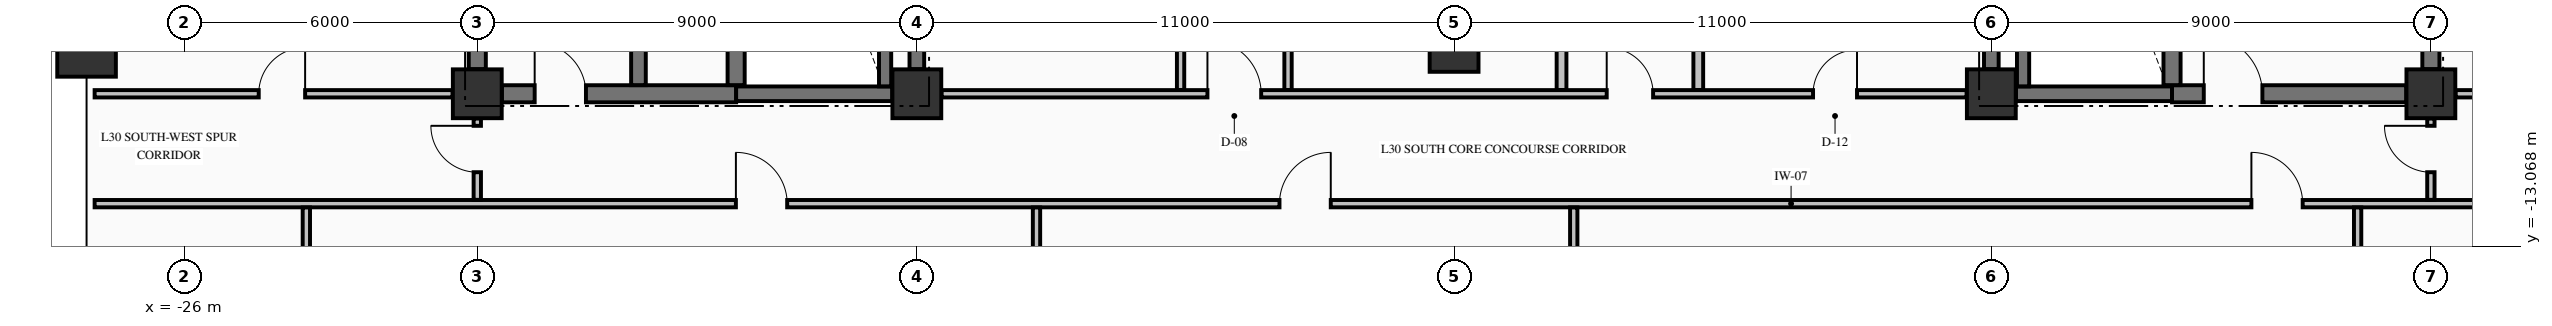
"""IFC4 building model, lengths in metres.
Left out: names, types, materials, properties, quantities, classifications, styles, units other than length and angle.
Written with IfcOpenShell. Run it as: python <this file> out.ifc"""

import sys

from ifc_helpers import new_model, si_unit, direction, frame, frame_2d, origin, origin_2d, place, context, subcontext, project, spatial, rectangle, extrude, element, fill, save


model = new_model("IFC4")
c1 = context("Model", 3, precision=1e-05, world=origin(), true_north=direction((0.0, 1.0)))
c2 = subcontext(c1, "Body", "Model", "MODEL_VIEW")
j1 = project(units=[si_unit("LENGTHUNIT", "METRE"), si_unit("PLANEANGLEUNIT", "RADIAN")], contexts=[c1])
p1 = place(None, origin())
s1 = spatial("IfcSite", under=j1, at=p1, CompositionType="ELEMENT")
p2 = place(p1, origin())
s2 = spatial("IfcBuilding", under=s1, at=p2, CompositionType="ELEMENT")
p3 = place(p2, frame((0.0, 0.0, 121.35)))
s3 = spatial("IfcBuildingStorey", under=s2, at=p3, CompositionType="ELEMENT", Elevation=121.35)
p4 = place(p3, frame((-28.0, -9.0, -0.425), z_axis=(0.0, 0.0, 1.0), x_axis=(1.0, 0.0, 0.0)))
e1 = element("IfcColumn", 1, at=p4, inside=s3, PredefinedType="COLUMN", context=c2, shape_type="SweptSolid", body=[
    extrude(rectangle(XDim=1.2, YDim=1.2, at=origin_2d()), origin(), (0.0, 0.0, 1.0), 3.745),
])
for number, where, z_axis, x_axis in (
    (2, (-20.0, -9.95, -0.425), (0.0, 0.0, 1.0), (1.0, 0.0, 0.0)),
    (3, (-11.0, -9.95, -0.425), (0.0, 0.0, 1.0), (1.0, 0.0, 0.0)),
    (4, (11.0, -9.95, -0.425), (0.0, 0.0, 1.0), (1.0, 0.0, 0.0)),
    (5, (20.0, -9.95, -0.425), (0.0, 0.0, 1.0), (1.0, 0.0, 0.0)),
    (6, (0.0, -9.0, -0.425), (0.0, 0.0, 1.0), (1.0, 0.0, 0.0)),
):
    element("IfcColumn", number, at=place(p3, frame(where, z_axis=z_axis, x_axis=x_axis)), inside=s3, PredefinedType="COLUMN", context=c2, shape_type="SweptSolid", body=[
        extrude(rectangle(XDim=1.0, YDim=1.0, at=origin_2d()), origin(), (0.0, 0.0, 1.0), 3.745),
    ])
p5 = place(p3, frame((-19.496, -9.95, 0.0), z_axis=(0.0, 0.0, 1.0), x_axis=(1.0, 0.0, 0.0)))
e7 = element("IfcWall", 7, at=p5, inside=s3, PredefinedType="SHEAR", context=c2, shape_type="SweptSolid", body=[
    extrude(rectangle(XDim=4.796, YDim=0.35, at=frame_2d((2.398, 0.0))), origin(), (0.0, 0.0, 1.0), 3.32),
])
p6 = place(p5, frame((0.671, 0.0, 0.0)))
e8 = element("IfcOpeningElement", 8, at=p6, cuts=e7, PredefinedType="OPENING", context=c2, shape_type="SweptSolid", body=[
    extrude(rectangle(XDim=1.05, YDim=2.15, at=frame_2d((0.525, 1.075))), frame((0.0, 0.185, 0.0), z_axis=(0.0, -1.0, 0.0), x_axis=(1.0, 0.0, 0.0)), (0.0, 0.0, 1.0), 0.37),
])
for number, where, z_axis, x_axis in (
    (9, (-14.7, -9.95, 0.0), (0.0, 0.0, 1.0), (1.0, 0.0, 0.0)),
    (10, (11.504, -9.95, 0.0), (0.0, 0.0, 1.0), (1.0, 0.0, 0.0)),
):
    element("IfcWall", number, at=place(p3, frame(where, z_axis=z_axis, x_axis=x_axis)), inside=s3, PredefinedType="SHEAR", context=c2, shape_type="SweptSolid", body=[
        extrude(rectangle(XDim=3.196, YDim=0.3, at=frame_2d((1.598, 0.0))), origin(), (0.0, 0.0, 1.0), 3.32),
    ])
p7 = place(p3, frame((14.7, -9.95, 0.0), z_axis=(0.0, 0.0, 1.0), x_axis=(1.0, 0.0, 0.0)))
e11 = element("IfcWall", 11, at=p7, inside=s3, PredefinedType="SHEAR", context=c2, shape_type="SweptSolid", body=[
    extrude(rectangle(XDim=4.796, YDim=0.35, at=frame_2d((2.398, 0.0))), origin(), (0.0, 0.0, 1.0), 3.32),
])
p8 = place(p7, frame((0.65, 0.0, 0.0)))
e12 = element("IfcOpeningElement", 12, at=p8, cuts=e11, PredefinedType="OPENING", context=c2, shape_type="SweptSolid", body=[
    extrude(rectangle(XDim=1.2, YDim=2.15, at=frame_2d((0.6, 1.075))), frame((0.0, 0.185, 0.0), z_axis=(0.0, -1.0, 0.0), x_axis=(1.0, 0.0, 0.0)), (0.0, 0.0, 1.0), 0.37),
])
p9 = place(p3, frame((-27.835, -12.2, 0.0), z_axis=(0.0, 0.0, 1.0), x_axis=(1.0, 0.0, 0.0)))
e13 = element("IfcWall", 13, at=p9, inside=s3, PredefinedType="PARTITIONING", context=c2, shape_type="SweptSolid", body=[
    extrude(rectangle(XDim=50.67, YDim=0.15, at=frame_2d((25.335, 0.0))), origin(), (0.0, 0.0, 1.0), 3.32),
])
p10 = place(p9, frame((13.13, 0.0, 0.0)))
e14 = element("IfcOpeningElement", 14, at=p10, cuts=e13, PredefinedType="OPENING", context=c2, shape_type="SweptSolid", body=[
    extrude(rectangle(XDim=1.05, YDim=2.15, at=frame_2d((0.525, 1.075))), frame((0.0, 0.085, 0.0), z_axis=(0.0, -1.0, 0.0), x_axis=(1.0, 0.0, 0.0)), (0.0, 0.0, 1.0), 0.17),
])
p11 = place(p9, frame((24.26, 0.0, 0.0)))
e15 = element("IfcOpeningElement", 15, at=p11, cuts=e13, PredefinedType="OPENING", context=c2, shape_type="SweptSolid", body=[
    extrude(rectangle(XDim=1.05, YDim=2.15, at=frame_2d((0.525, 1.075))), frame((0.0, 0.085, 0.0), z_axis=(0.0, -1.0, 0.0), x_axis=(1.0, 0.0, 0.0)), (0.0, 0.0, 1.0), 0.17),
])
p12 = place(p9, frame((44.16, 0.0, 0.0)))
e16 = element("IfcOpeningElement", 16, at=p12, cuts=e13, PredefinedType="OPENING", context=c2, shape_type="SweptSolid", body=[
    extrude(rectangle(XDim=1.05, YDim=2.15, at=frame_2d((0.525, 1.075))), frame((0.0, 0.085, 0.0), z_axis=(0.0, -1.0, 0.0), x_axis=(1.0, 0.0, 0.0)), (0.0, 0.0, 1.0), 0.17),
])
p13 = place(p3, frame((-27.835, -9.95, 0.0), z_axis=(0.0, 0.0, 1.0), x_axis=(1.0, 0.0, 0.0)))
e17 = element("IfcWall", 17, at=p13, inside=s3, PredefinedType="PARTITIONING", context=c2, shape_type="SweptSolid", body=[
    extrude(rectangle(XDim=7.329, YDim=0.15, at=frame_2d((3.665, 0.0))), origin(), (0.0, 0.0, 1.0), 3.32),
])
p14 = place(p13, frame((3.36, 0.0, 0.0)))
e18 = element("IfcOpeningElement", 18, at=p14, cuts=e17, PredefinedType="OPENING", context=c2, shape_type="SweptSolid", body=[
    extrude(rectangle(XDim=0.95, YDim=2.15, at=frame_2d((0.475, 1.075))), frame((0.0, 0.085, 0.0), z_axis=(0.0, -1.0, 0.0), x_axis=(1.0, 0.0, 0.0)), (0.0, 0.0, 1.0), 0.17),
])
p15 = place(p3, frame((-10.494, -9.95, 0.0), z_axis=(0.0, 0.0, 1.0), x_axis=(1.0, 0.0, 0.0)))
e19 = element("IfcWall", 19, at=p15, inside=s3, PredefinedType="PARTITIONING", context=c2, shape_type="SweptSolid", body=[
    extrude(rectangle(XDim=20.988, YDim=0.15, at=frame_2d((10.494, 0.0))), origin(), (0.0, 0.0, 1.0), 3.32),
])
p16 = place(p15, frame((5.444, 0.0, 0.0)))
e20 = element("IfcOpeningElement", 20, at=p16, cuts=e19, PredefinedType="OPENING", context=c2, shape_type="SweptSolid", body=[
    extrude(rectangle(XDim=1.1, YDim=2.15, at=frame_2d((0.55, 1.075))), frame((0.0, 0.085, 0.0), z_axis=(0.0, -1.0, 0.0), x_axis=(1.0, 0.0, 0.0)), (0.0, 0.0, 1.0), 0.17),
])
p17 = place(p15, frame((13.619, 0.0, 0.0)))
e21 = element("IfcOpeningElement", 21, at=p17, cuts=e19, PredefinedType="OPENING", context=c2, shape_type="SweptSolid", body=[
    extrude(rectangle(XDim=0.95, YDim=2.15, at=frame_2d((0.475, 1.075))), frame((0.0, 0.085, 0.0), z_axis=(0.0, -1.0, 0.0), x_axis=(1.0, 0.0, 0.0)), (0.0, 0.0, 1.0), 0.17),
])
p18 = place(p15, frame((17.844, 0.0, 0.0)))
e22 = element("IfcOpeningElement", 22, at=p18, cuts=e19, PredefinedType="OPENING", context=c2, shape_type="SweptSolid", body=[
    extrude(rectangle(XDim=0.9, YDim=2.15, at=frame_2d((0.45, 1.075))), frame((0.0, 0.085, 0.0), z_axis=(0.0, -1.0, 0.0), x_axis=(1.0, 0.0, 0.0)), (0.0, 0.0, 1.0), 0.17),
])
p19 = place(p3, frame((20.506, -9.95, 0.0), z_axis=(0.0, 0.0, 1.0), x_axis=(1.0, 0.0, 0.0)))
e23 = element("IfcWall", 23, at=p19, inside=s3, PredefinedType="PARTITIONING", context=c2, shape_type="SweptSolid", body=[
    extrude(rectangle(XDim=2.329, YDim=0.15, at=frame_2d((1.165, 0.0))), origin(), (0.0, 0.0, 1.0), 3.32),
])
p20 = place(p19, frame((0.494, 0.0, 0.0)))
e24 = element("IfcOpeningElement", 24, at=p20, cuts=e23, PredefinedType="OPENING", context=c2, shape_type="SweptSolid", body=[
    extrude(rectangle(XDim=1.0, YDim=2.15, at=frame_2d((0.5, 1.075))), frame((0.0, 0.085, 0.0), z_axis=(0.0, -1.0, 0.0), x_axis=(1.0, 0.0, 0.0)), (0.0, 0.0, 1.0), 0.17),
])
p21 = place(p3, frame((-20.0, -9.446, 0.0), z_axis=(0.0, 0.0, 1.0), x_axis=(0.0, 1.0, 0.0)))
e25 = element("IfcWall", 25, at=p21, inside=s3, PredefinedType="SHEAR", context=c2, shape_type="SweptSolid", body=[
    extrude(rectangle(XDim=8.942, YDim=0.35, at=frame_2d((4.471, 0.0))), origin(), (0.0, 0.0, 1.0), 3.32),
])
p22 = place(p3, frame((-16.7, -9.773, 0.0), z_axis=(0.0, 0.0, 1.0), x_axis=(0.0, 1.0, 0.0)))
e26 = element("IfcWall", 26, at=p22, inside=s3, PredefinedType="SHEAR", context=c2, shape_type="SweptSolid", body=[
    extrude(rectangle(XDim=9.371, YDim=0.3, at=frame_2d((4.686, 0.0))), origin(), (0.0, 0.0, 1.0), 3.32),
])
p23 = place(p3, frame((-14.7, -9.773, 0.0), z_axis=(0.0, 0.0, 1.0), x_axis=(0.0, 1.0, 0.0)))
e27 = element("IfcWall", 27, at=p23, inside=s3, PredefinedType="SHEAR", context=c2, shape_type="SweptSolid", body=[
    extrude(rectangle(XDim=9.371, YDim=0.35, at=frame_2d((4.686, 0.0))), origin(), (0.0, 0.0, 1.0), 3.32),
])
p24 = place(p3, frame((-11.65, -9.798, 0.0), z_axis=(0.0, 0.0, 1.0), x_axis=(0.0, 1.0, 0.0)))
e28 = element("IfcWall", 28, at=p24, inside=s3, PredefinedType="SOLIDWALL", context=c2, shape_type="SweptSolid", body=[
    extrude(rectangle(XDim=9.396, YDim=0.25, at=frame_2d((4.698, 0.0))), origin(), (0.0, 0.0, 1.0), 3.32),
])
for number, where, z_axis, x_axis in (
    (29, (-11.0, -9.446, 0.0), (0.0, 0.0, 1.0), (0.0, 1.0, 0.0)),
    (30, (11.0, -9.446, 0.0), (0.0, 0.0, 1.0), (0.0, 1.0, 0.0)),
):
    element("IfcWall", number, at=place(p3, frame(where, z_axis=z_axis, x_axis=x_axis)), inside=s3, PredefinedType="SHEAR", context=c2, shape_type="SweptSolid", body=[
        extrude(rectangle(XDim=8.942, YDim=0.3, at=frame_2d((4.471, 0.0))), origin(), (0.0, 0.0, 1.0), 3.32),
    ])
p25 = place(p3, frame((11.65, -9.798, 0.0), z_axis=(0.0, 0.0, 1.0), x_axis=(0.0, 1.0, 0.0)))
e31 = element("IfcWall", 31, at=p25, inside=s3, PredefinedType="SOLIDWALL", context=c2, shape_type="SweptSolid", body=[
    extrude(rectangle(XDim=9.396, YDim=0.25, at=frame_2d((4.698, 0.0))), origin(), (0.0, 0.0, 1.0), 3.32),
])
p26 = place(p3, frame((14.7, -9.773, 0.0), z_axis=(0.0, 0.0, 1.0), x_axis=(0.0, 1.0, 0.0)))
e32 = element("IfcWall", 32, at=p26, inside=s3, PredefinedType="SHEAR", context=c2, shape_type="SweptSolid", body=[
    extrude(rectangle(XDim=9.371, YDim=0.35, at=frame_2d((4.686, 0.0))), origin(), (0.0, 0.0, 1.0), 3.32),
])
p27 = place(p3, frame((20.0, -9.446, 0.0), z_axis=(0.0, 0.0, 1.0), x_axis=(0.0, 1.0, 0.0)))
e33 = element("IfcWall", 33, at=p27, inside=s3, PredefinedType="SHEAR", context=c2, shape_type="SweptSolid", body=[
    extrude(rectangle(XDim=2.269, YDim=0.35, at=frame_2d((1.135, 0.0))), origin(), (0.0, 0.0, 1.0), 3.32),
])
p28 = place(p3, frame((-23.5, -20.394, 0.0), z_axis=(0.0, 0.0, 1.0), x_axis=(0.0, 1.0, 0.0)))
e34 = element("IfcWall", 34, at=p28, inside=s3, PredefinedType="PARTITIONING", context=c2, shape_type="SweptSolid", body=[
    extrude(rectangle(XDim=8.116, YDim=0.15, at=frame_2d((4.058, 0.0))), origin(), (0.0, 0.0, 1.0), 3.32),
])
p29 = place(p3, frame((-20.0, -12.122, 0.0), z_axis=(0.0, 0.0, 1.0), x_axis=(0.0, 1.0, 0.0)))
e35 = element("IfcWall", 35, at=p29, inside=s3, PredefinedType="PARTITIONING", context=c2, shape_type="SweptSolid", body=[
    extrude(rectangle(XDim=1.666, YDim=0.15, at=frame_2d((0.833, 0.0))), origin(), (0.0, 0.0, 1.0), 2.81),
])
p30 = place(p29, frame((0.566, 0.0, 0.0)))
e36 = element("IfcOpeningElement", 36, at=p30, cuts=e35, PredefinedType="OPENING", context=c2, shape_type="SweptSolid", body=[
    extrude(rectangle(XDim=0.95, YDim=2.15, at=frame_2d((0.475, 1.075))), frame((0.0, 0.085, 0.0), z_axis=(0.0, -1.0, 0.0), x_axis=(1.0, 0.0, 0.0)), (0.0, 0.0, 1.0), 0.17),
])
p31 = place(p3, frame((-8.55, -25.335, 0.0), z_axis=(0.0, 0.0, 1.0), x_axis=(0.0, 1.0, 0.0)))
e37 = element("IfcWall", 37, at=p31, inside=s3, PredefinedType="PARTITIONING", context=c2, shape_type="SweptSolid", body=[
    extrude(rectangle(XDim=13.057, YDim=0.15, at=frame_2d((6.528, 0.0))), origin(), (0.0, 0.0, 1.0), 3.32),
])
p32 = place(p3, frame((-5.6, -9.872, 0.0), z_axis=(0.0, 0.0, 1.0), x_axis=(0.0, 1.0, 0.0)))
e38 = element("IfcWall", 38, at=p32, inside=s3, PredefinedType="PARTITIONING", context=c2, shape_type="SweptSolid", body=[
    extrude(rectangle(XDim=9.544, YDim=0.15, at=frame_2d((4.772, 0.0))), origin(), (0.0, 0.0, 1.0), 3.32),
])
p33 = place(p3, frame((-3.4, -9.872, 0.0), z_axis=(0.0, 0.0, 1.0), x_axis=(0.0, 1.0, 0.0)))
e39 = element("IfcWall", 39, at=p33, inside=s3, PredefinedType="PARTITIONING", context=c2, shape_type="SweptSolid", body=[
    extrude(rectangle(XDim=5.519, YDim=0.15, at=frame_2d((2.76, 0.0))), origin(), (0.0, 0.0, 1.0), 3.32),
])
p34 = place(p33, frame((2.597, 0.0, 0.0)))
e40 = element("IfcOpeningElement", 40, at=p34, cuts=e39, PredefinedType="OPENING", context=c2, shape_type="SweptSolid", body=[
    extrude(rectangle(XDim=0.95, YDim=2.15, at=frame_2d((0.475, 1.075))), frame((0.0, 0.085, 0.0), z_axis=(0.0, -1.0, 0.0), x_axis=(1.0, 0.0, 0.0)), (0.0, 0.0, 1.0), 0.17),
])
p35 = place(p3, frame((2.2, -9.872, 0.0), z_axis=(0.0, 0.0, 1.0), x_axis=(0.0, 1.0, 0.0)))
e41 = element("IfcWall", 41, at=p35, inside=s3, PredefinedType="PARTITIONING", context=c2, shape_type="SweptSolid", body=[
    extrude(rectangle(XDim=5.519, YDim=0.2, at=frame_2d((2.76, 0.0))), origin(), (0.0, 0.0, 1.0), 3.32),
])
p36 = place(p3, frame((2.45, -25.335, 0.0), z_axis=(0.0, 0.0, 1.0), x_axis=(0.0, 1.0, 0.0)))
e42 = element("IfcWall", 42, at=p36, inside=s3, PredefinedType="PARTITIONING", context=c2, shape_type="SweptSolid", body=[
    extrude(rectangle(XDim=13.057, YDim=0.15, at=frame_2d((6.528, 0.0))), origin(), (0.0, 0.0, 1.0), 3.32),
])
p37 = place(p3, frame((5.0, -9.872, 0.0), z_axis=(0.0, 0.0, 1.0), x_axis=(0.0, 1.0, 0.0)))
e43 = element("IfcWall", 43, at=p37, inside=s3, PredefinedType="PARTITIONING", context=c2, shape_type="SweptSolid", body=[
    extrude(rectangle(XDim=5.519, YDim=0.2, at=frame_2d((2.76, 0.0))), origin(), (0.0, 0.0, 1.0), 3.32),
])
p38 = place(p3, frame((18.5, -20.394, 0.0), z_axis=(0.0, 0.0, 1.0), x_axis=(0.0, 1.0, 0.0)))
e44 = element("IfcWall", 44, at=p38, inside=s3, PredefinedType="PARTITIONING", context=c2, shape_type="SweptSolid", body=[
    extrude(rectangle(XDim=8.116, YDim=0.15, at=frame_2d((4.058, 0.0))), origin(), (0.0, 0.0, 1.0), 3.32),
])
p39 = place(p3, frame((20.0, -12.122, 0.0), z_axis=(0.0, 0.0, 1.0), x_axis=(0.0, 1.0, 0.0)))
e45 = element("IfcWall", 45, at=p39, inside=s3, PredefinedType="PARTITIONING", context=c2, shape_type="SweptSolid", body=[
    extrude(rectangle(XDim=1.666, YDim=0.15, at=frame_2d((0.833, 0.0))), origin(), (0.0, 0.0, 1.0), 2.81),
])
p40 = place(p39, frame((0.566, 0.0, 0.0)))
e46 = element("IfcOpeningElement", 46, at=p40, cuts=e45, PredefinedType="OPENING", context=c2, shape_type="SweptSolid", body=[
    extrude(rectangle(XDim=0.95, YDim=2.15, at=frame_2d((0.475, 1.075))), frame((0.0, 0.085, 0.0), z_axis=(0.0, -1.0, 0.0), x_axis=(1.0, 0.0, 0.0)), (0.0, 0.0, 1.0), 0.17),
])
p41 = place(p6, origin())
e47 = element("IfcDoor", 47, at=p41, inside=s3, OperationType="SINGLE_SWING_LEFT", PredefinedType="DOOR", context=c2, shape_type="SweptSolid", body=[
    extrude(rectangle(XDim=1.05, YDim=2.15, at=frame_2d((0.525, 1.075))), frame((0.0, 0.025, 0.0), z_axis=(0.0, -1.0, 0.0), x_axis=(1.0, 0.0, 0.0)), (0.0, 0.0, 1.0), 0.05),
])
fill(e8, e47)
p42 = place(p8, origin())
e48 = element("IfcDoor", 48, at=p42, inside=s3, OperationType="SINGLE_SWING_LEFT", PredefinedType="DOOR", context=c2, shape_type="SweptSolid", body=[
    extrude(rectangle(XDim=1.2, YDim=2.15, at=frame_2d((0.6, 1.075))), frame((0.0, 0.025, 0.0), z_axis=(0.0, -1.0, 0.0), x_axis=(1.0, 0.0, 0.0)), (0.0, 0.0, 1.0), 0.05),
])
fill(e12, e48)
p43 = place(p16, origin())
e49 = element("IfcDoor", 49, at=p43, inside=s3, OperationType="SINGLE_SWING_LEFT", PredefinedType="DOOR", context=c2, shape_type="SweptSolid", body=[
    extrude(rectangle(XDim=1.1, YDim=2.15, at=frame_2d((0.55, 1.075))), frame((0.0, 0.025, 0.0), z_axis=(0.0, -1.0, 0.0), x_axis=(1.0, 0.0, 0.0)), (0.0, 0.0, 1.0), 0.05),
])
fill(e20, e49)
p44 = place(p10, origin())
e50 = element("IfcDoor", 50, at=p44, inside=s3, OperationType="SINGLE_SWING_LEFT", PredefinedType="DOOR", context=c2, shape_type="SweptSolid", body=[
    extrude(rectangle(XDim=1.05, YDim=2.15, at=frame_2d((0.525, 1.075))), frame((0.0, 0.025, 0.0), z_axis=(0.0, -1.0, 0.0), x_axis=(1.0, 0.0, 0.0)), (0.0, 0.0, 1.0), 0.05),
])
fill(e14, e50)
p45 = place(p11, origin())
e51 = element("IfcDoor", 51, at=p45, inside=s3, OperationType="SINGLE_SWING_RIGHT", PredefinedType="DOOR", context=c2, shape_type="SweptSolid", body=[
    extrude(rectangle(XDim=1.05, YDim=2.15, at=frame_2d((0.525, 1.075))), frame((0.0, 0.025, 0.0), z_axis=(0.0, -1.0, 0.0), x_axis=(1.0, 0.0, 0.0)), (0.0, 0.0, 1.0), 0.05),
])
fill(e15, e51)
p46 = place(p12, origin())
e52 = element("IfcDoor", 52, at=p46, inside=s3, OperationType="SINGLE_SWING_LEFT", PredefinedType="DOOR", context=c2, shape_type="SweptSolid", body=[
    extrude(rectangle(XDim=1.05, YDim=2.15, at=frame_2d((0.525, 1.075))), frame((0.0, 0.025, 0.0), z_axis=(0.0, -1.0, 0.0), x_axis=(1.0, 0.0, 0.0)), (0.0, 0.0, 1.0), 0.05),
])
fill(e16, e52)
p47 = place(p17, origin())
e53 = element("IfcDoor", 53, at=p47, inside=s3, OperationType="SINGLE_SWING_LEFT", PredefinedType="DOOR", context=c2, shape_type="SweptSolid", body=[
    extrude(rectangle(XDim=0.95, YDim=2.15, at=frame_2d((0.475, 1.075))), frame((0.0, 0.025, 0.0), z_axis=(0.0, -1.0, 0.0), x_axis=(1.0, 0.0, 0.0)), (0.0, 0.0, 1.0), 0.05),
])
fill(e21, e53)
p48 = place(p18, origin())
e54 = element("IfcDoor", 54, at=p48, inside=s3, OperationType="SINGLE_SWING_RIGHT", PredefinedType="DOOR", context=c2, shape_type="SweptSolid", body=[
    extrude(rectangle(XDim=0.9, YDim=2.15, at=frame_2d((0.45, 1.075))), frame((0.0, 0.025, 0.0), z_axis=(0.0, -1.0, 0.0), x_axis=(1.0, 0.0, 0.0)), (0.0, 0.0, 1.0), 0.05),
])
fill(e22, e54)
p49 = place(p30, origin())
e55 = element("IfcDoor", 55, at=p49, inside=s3, OperationType="SINGLE_SWING_RIGHT", PredefinedType="DOOR", context=c2, shape_type="SweptSolid", body=[
    extrude(rectangle(XDim=0.95, YDim=2.15, at=frame_2d((0.475, 1.075))), frame((0.0, 0.025, 0.0), z_axis=(0.0, -1.0, 0.0), x_axis=(1.0, 0.0, 0.0)), (0.0, 0.0, 1.0), 0.05),
])
fill(e36, e55)
p50 = place(p14, origin())
e56 = element("IfcDoor", 56, at=p50, inside=s3, OperationType="SINGLE_SWING_RIGHT", PredefinedType="DOOR", context=c2, shape_type="SweptSolid", body=[
    extrude(rectangle(XDim=0.95, YDim=2.15, at=frame_2d((0.475, 1.075))), frame((0.0, 0.025, 0.0), z_axis=(0.0, -1.0, 0.0), x_axis=(1.0, 0.0, 0.0)), (0.0, 0.0, 1.0), 0.05),
])
fill(e18, e56)
p51 = place(p40, origin())
e57 = element("IfcDoor", 57, at=p51, inside=s3, OperationType="SINGLE_SWING_RIGHT", PredefinedType="DOOR", context=c2, shape_type="SweptSolid", body=[
    extrude(rectangle(XDim=0.95, YDim=2.15, at=frame_2d((0.475, 1.075))), frame((0.0, 0.025, 0.0), z_axis=(0.0, -1.0, 0.0), x_axis=(1.0, 0.0, 0.0)), (0.0, 0.0, 1.0), 0.05),
])
fill(e46, e57)
save(model, sys.argv[1])
